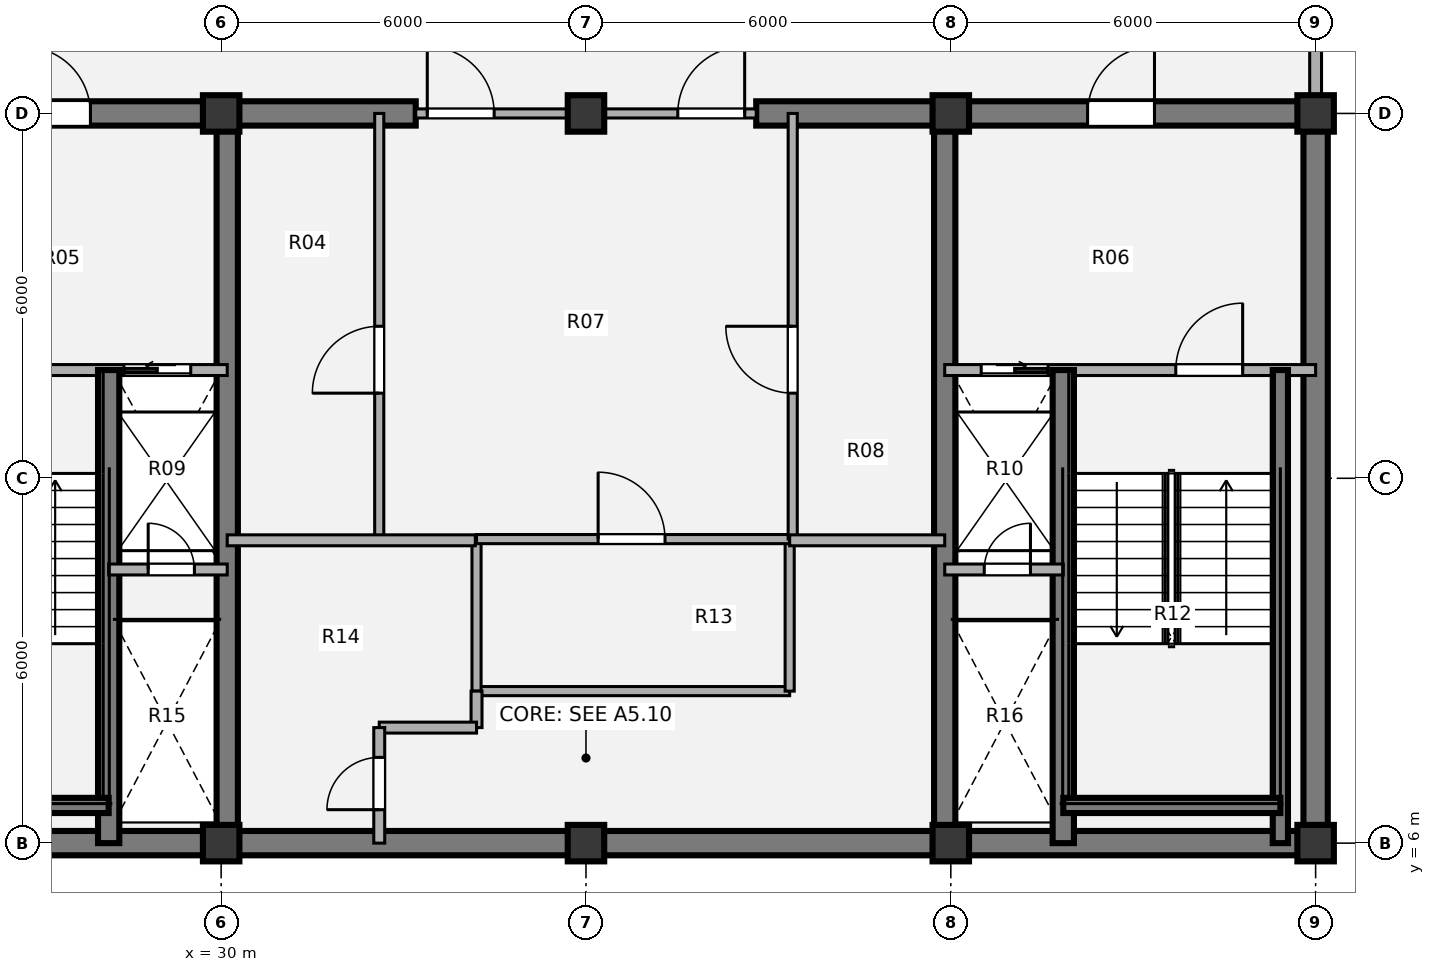
"""IFC4 building model, lengths in metres.
Left out: names, types, materials, properties, quantities, classifications, styles, units other than length and angle.
Written with IfcOpenShell. Run it as: python <this file> out.ifc"""

import sys

from ifc_helpers import new_model, si_unit, direction, frame, frame_2d, origin, origin_2d, place, context, subcontext, project, spatial, rectangle, extrude, source, transform, mapped, element, fill, save


model = new_model("IFC4")
c1 = context("Model", 3, precision=1e-05, world=origin(), true_north=direction((0.0, 1.0)))
c2 = subcontext(c1, "Body", "Model", "MODEL_VIEW")
j1 = project(units=[si_unit("LENGTHUNIT", "METRE"), si_unit("PLANEANGLEUNIT", "RADIAN")], contexts=[c1])
p1 = place(None, origin())
s1 = spatial("IfcSite", under=j1, at=p1, CompositionType="ELEMENT")
p2 = place(p1, origin())
s2 = spatial("IfcBuilding", under=s1, at=p2, CompositionType="ELEMENT")
p3 = place(p2, frame((0.0, 0.0, 307.8)))
s3 = spatial("IfcBuildingStorey", under=s2, at=p3, CompositionType="ELEMENT", Elevation=307.8)
m1 = source(origin(), c2, "Body", "SweptSolid", [
    extrude(rectangle(XDim=0.6, YDim=0.6, at=origin_2d()), origin(), (0.0, 0.0, 1.0), 3.96),
])
for number, where, z_axis, x_axis in (
    (1, (30.0, 6.0, 0.0), (0.0, 0.0, 1.0), (1.0, 0.0, 0.0)),
    (2, (36.0, 6.0, 0.0), (0.0, 0.0, 1.0), (1.0, 0.0, 0.0)),
    (3, (42.0, 6.0, 0.0), (0.0, 0.0, 1.0), (1.0, 0.0, 0.0)),
    (4, (48.0, 6.0, 0.0), (0.0, 0.0, 1.0), (1.0, 0.0, 0.0)),
    (5, (30.0, 18.0, 0.0), (0.0, 0.0, 1.0), (1.0, 0.0, 0.0)),
    (6, (36.0, 18.0, 0.0), (0.0, 0.0, 1.0), (1.0, 0.0, 0.0)),
    (7, (42.0, 18.0, 0.0), (0.0, 0.0, 1.0), (1.0, 0.0, 0.0)),
    (8, (48.0, 18.0, 0.0), (0.0, 0.0, 1.0), (1.0, 0.0, 0.0)),
):
    element("IfcColumn", number, at=place(p3, frame(where, z_axis=z_axis, x_axis=x_axis)), inside=s3, PredefinedType="COLUMN", context=c2, shape_type="MappedRepresentation", body=[
        mapped(m1, transform((0.0, 0.0, 0.0), x_axis=(1.0, 0.0, 0.0), y_axis=(0.0, 1.0, 0.0), z_axis=(0.0, 0.0, 1.0), scale=1.0)),
    ])
p4 = place(p3, frame((48.2, 6.0, 0.0), z_axis=(0.0, 0.0, 1.0), x_axis=(-1.0, 0.0, 0.0)))
e9 = element("IfcWall", 9, at=p4, inside=s3, PredefinedType="SHEAR", context=c2, shape_type="SweptSolid", body=[
    extrude(rectangle(XDim=24.4, YDim=0.4, at=frame_2d((12.2, 0.0))), origin(), (0.0, 0.0, 1.0), 3.96),
])
p5 = place(p3, frame((48.0, 18.0, 0.0), z_axis=(0.0, 0.0, 1.0), x_axis=(0.0, -1.0, 0.0)))
e10 = element("IfcWall", 10, at=p5, inside=s3, PredefinedType="SHEAR", context=c2, shape_type="SweptSolid", body=[
    extrude(rectangle(XDim=12.0, YDim=0.4, at=frame_2d((6.0, 0.0))), origin(), (0.0, 0.0, 1.0), 3.96),
])
p6 = place(p3, frame((23.8, 18.0, 0.0), z_axis=(0.0, 0.0, 1.0), x_axis=(1.0, 0.0, 0.0)))
e11 = element("IfcWall", 11, at=p6, inside=s3, PredefinedType="SHEAR", context=c2, shape_type="SweptSolid", body=[
    extrude(rectangle(XDim=9.4, YDim=0.4, at=frame_2d((4.7, 0.0))), origin(), (0.0, 0.0, 1.0), 3.96),
])
p7 = place(p6, frame((2.95, 0.0, 0.0)))
e12 = element("IfcOpeningElement", 12, at=p7, cuts=e11, PredefinedType="OPENING", context=c2, shape_type="SweptSolid", body=[
    extrude(rectangle(XDim=1.1, YDim=2.1, at=origin_2d()), frame((0.55, 0.21, 1.05), z_axis=(0.0, -1.0, 0.0), x_axis=(1.0, 0.0, 0.0)), (0.0, 0.0, 1.0), 0.42),
])
p8 = place(p3, frame((38.8, 18.0, 0.0), z_axis=(0.0, 0.0, 1.0), x_axis=(1.0, 0.0, 0.0)))
e13 = element("IfcWall", 13, at=p8, inside=s3, PredefinedType="SHEAR", context=c2, shape_type="SweptSolid", body=[
    extrude(rectangle(XDim=9.4, YDim=0.4, at=frame_2d((4.7, 0.0))), origin(), (0.0, 0.0, 1.0), 3.96),
])
p9 = place(p8, frame((5.45, 0.0, 0.0)))
e14 = element("IfcOpeningElement", 14, at=p9, cuts=e13, PredefinedType="OPENING", context=c2, shape_type="SweptSolid", body=[
    extrude(rectangle(XDim=1.1, YDim=2.1, at=origin_2d()), frame((0.55, 0.21, 1.05), z_axis=(0.0, -1.0, 0.0), x_axis=(1.0, 0.0, 0.0)), (0.0, 0.0, 1.0), 0.42),
])
for number, where, z_axis, x_axis in (
    (15, (30.1, 6.0, 0.0), (0.0, 0.0, 1.0), (0.0, 1.0, 0.0)),
    (16, (41.9, 18.0, 0.0), (0.0, 0.0, 1.0), (0.0, -1.0, 0.0)),
):
    element("IfcWall", number, at=place(p3, frame(where, z_axis=z_axis, x_axis=x_axis)), inside=s3, PredefinedType="SHEAR", context=c2, shape_type="SweptSolid", body=[
        extrude(rectangle(XDim=12.0, YDim=0.35, at=frame_2d((6.0, 0.0))), origin(), (0.0, 0.0, 1.0), 3.96),
    ])
p10 = place(p3, frame((48.0, 21.05, 0.0), z_axis=(0.0, 0.0, 1.0), x_axis=(0.0, -1.0, 0.0)))
e17 = element("IfcWall", 17, at=p10, inside=s3, PredefinedType="SOLIDWALL", context=c2, shape_type="SweptSolid", body=[
    extrude(rectangle(XDim=2.77, YDim=0.195, at=frame_2d((1.385, 0.0))), origin(), (0.0, 0.0, 1.0), 2.898),
])
p11 = place(p3, frame((32.6, 11.0, 0.0), z_axis=(0.0, 0.0, 1.0), x_axis=(0.0, 1.0, 0.0)))
e18 = element("IfcWall", 18, at=p11, inside=s3, PredefinedType="PARTITIONING", context=c2, shape_type="SweptSolid", body=[
    extrude(rectangle(XDim=7.0, YDim=0.15, at=frame_2d((3.5, 0.0))), origin(), (0.0, 0.0, 1.0), 3.68),
])
p12 = place(p11, frame((2.4, 0.0, 0.0)))
e19 = element("IfcOpeningElement", 19, at=p12, cuts=e18, PredefinedType="OPENING", context=c2, shape_type="SweptSolid", body=[
    extrude(rectangle(XDim=1.1, YDim=2.1, at=origin_2d()), frame((0.55, 0.085, 1.05), z_axis=(0.0, -1.0, 0.0), x_axis=(1.0, 0.0, 0.0)), (0.0, 0.0, 1.0), 0.17),
])
p13 = place(p3, frame((34.2, 8.5, 0.0), z_axis=(0.0, 0.0, 1.0), x_axis=(1.0, 0.0, 0.0)))
e20 = element("IfcWall", 20, at=p13, inside=s3, PredefinedType="PARTITIONING", context=c2, shape_type="SweptSolid", body=[
    extrude(rectangle(XDim=5.15, YDim=0.15, at=frame_2d((2.575, 0.0))), origin(), (0.0, 0.0, 1.0), 3.68),
])
for number, where, z_axis, x_axis in (
    (21, (34.2, 8.5, 0.0), (0.0, 0.0, 1.0), (0.0, 1.0, 0.0)),
    (22, (39.35, 8.5, 0.0), (0.0, 0.0, 1.0), (0.0, 1.0, 0.0)),
):
    element("IfcWall", number, at=place(p3, frame(where, z_axis=z_axis, x_axis=x_axis)), inside=s3, PredefinedType="PARTITIONING", context=c2, shape_type="SweptSolid", body=[
        extrude(rectangle(XDim=2.5, YDim=0.15, at=frame_2d((1.25, 0.0))), origin(), (0.0, 0.0, 1.0), 3.68),
    ])
p14 = place(p3, frame((34.2, 11.0, 0.0), z_axis=(0.0, 0.0, 1.0), x_axis=(1.0, 0.0, 0.0)))
e23 = element("IfcWall", 23, at=p14, inside=s3, PredefinedType="PARTITIONING", context=c2, shape_type="SweptSolid", body=[
    extrude(rectangle(XDim=5.15, YDim=0.15, at=frame_2d((2.575, 0.0))), origin(), (0.0, 0.0, 1.0), 3.68),
])
p15 = place(p14, frame((2.0, 0.0, 0.0)))
e24 = element("IfcOpeningElement", 24, at=p15, cuts=e23, PredefinedType="OPENING", context=c2, shape_type="SweptSolid", body=[
    extrude(rectangle(XDim=1.1, YDim=2.1, at=origin_2d()), frame((0.55, 0.085, 1.05), z_axis=(0.0, -1.0, 0.0), x_axis=(1.0, 0.0, 0.0)), (0.0, 0.0, 1.0), 0.17),
])
p16 = place(p3, frame((39.4, 11.0, 0.0), z_axis=(0.0, 0.0, 1.0), x_axis=(0.0, 1.0, 0.0)))
e25 = element("IfcWall", 25, at=p16, inside=s3, PredefinedType="PARTITIONING", context=c2, shape_type="SweptSolid", body=[
    extrude(rectangle(XDim=7.0, YDim=0.15, at=frame_2d((3.5, 0.0))), origin(), (0.0, 0.0, 1.0), 3.68),
])
p17 = place(p16, frame((2.4, 0.0, 0.0)))
e26 = element("IfcOpeningElement", 26, at=p17, cuts=e25, PredefinedType="OPENING", context=c2, shape_type="SweptSolid", body=[
    extrude(rectangle(XDim=1.1, YDim=2.1, at=origin_2d()), frame((0.55, 0.085, 1.05), z_axis=(0.0, -1.0, 0.0), x_axis=(1.0, 0.0, 0.0)), (0.0, 0.0, 1.0), 0.17),
])
p18 = place(p3, frame((30.1, 10.98, 0.0), z_axis=(0.0, 0.0, 1.0), x_axis=(1.0, 0.0, 0.0)))
e27 = element("IfcWall", 27, at=p18, inside=s3, PredefinedType="PARTITIONING", context=c2, shape_type="SweptSolid", body=[
    extrude(rectangle(XDim=4.08, YDim=0.18, at=frame_2d((2.04, 0.0))), origin(), (0.0, 0.0, 1.0), 3.68),
])
p19 = place(p3, frame((34.2, 7.9, 0.0), z_axis=(0.0, 0.0, 1.0), x_axis=(0.0, 1.0, 0.0)))
e28 = element("IfcWall", 28, at=p19, inside=s3, PredefinedType="PARTITIONING", context=c2, shape_type="SweptSolid", body=[
    extrude(rectangle(XDim=0.6, YDim=0.18, at=frame_2d((0.3, 0.0))), origin(), (0.0, 0.0, 1.0), 3.68),
])
p20 = place(p3, frame((32.6, 7.9, 0.0), z_axis=(0.0, 0.0, 1.0), x_axis=(1.0, 0.0, 0.0)))
e29 = element("IfcWall", 29, at=p20, inside=s3, PredefinedType="PARTITIONING", context=c2, shape_type="SweptSolid", body=[
    extrude(rectangle(XDim=1.6, YDim=0.18, at=frame_2d((0.8, 0.0))), origin(), (0.0, 0.0, 1.0), 3.68),
])
p21 = place(p3, frame((32.6, 6.0, 0.0), z_axis=(0.0, 0.0, 1.0), x_axis=(0.0, 1.0, 0.0)))
e30 = element("IfcWall", 30, at=p21, inside=s3, PredefinedType="PARTITIONING", context=c2, shape_type="SweptSolid", body=[
    extrude(rectangle(XDim=1.9, YDim=0.18, at=frame_2d((0.95, 0.0))), origin(), (0.0, 0.0, 1.0), 3.68),
])
p22 = place(p21, frame((0.55, 0.0, 0.0)))
e31 = element("IfcOpeningElement", 31, at=p22, cuts=e30, PredefinedType="OPENING", context=c2, shape_type="SweptSolid", body=[
    extrude(rectangle(XDim=0.86, YDim=2.1, at=origin_2d()), frame((0.43, 0.1, 1.05), z_axis=(0.0, -1.0, 0.0), x_axis=(1.0, 0.0, 0.0)), (0.0, 0.0, 1.0), 0.2),
])
p23 = place(p3, frame((39.35, 10.98, 0.0), z_axis=(0.0, 0.0, 1.0), x_axis=(1.0, 0.0, 0.0)))
e32 = element("IfcWall", 32, at=p23, inside=s3, PredefinedType="PARTITIONING", context=c2, shape_type="SweptSolid", body=[
    extrude(rectangle(XDim=2.55, YDim=0.18, at=frame_2d((1.275, 0.0))), origin(), (0.0, 0.0, 1.0), 3.68),
])
p24 = place(p3, frame((33.2, 18.0, 0.0), z_axis=(0.0, 0.0, 1.0), x_axis=(1.0, 0.0, 0.0)))
e33 = element("IfcWall", 33, at=p24, inside=s3, PredefinedType="PARTITIONING", context=c2, shape_type="SweptSolid", body=[
    extrude(rectangle(XDim=5.6, YDim=0.15, at=frame_2d((2.8, 0.0))), origin(), (0.0, 0.0, 1.0), 2.695),
])
p25 = place(p24, frame((0.19, 0.0, 0.0)))
e34 = element("IfcOpeningElement", 34, at=p25, cuts=e33, PredefinedType="OPENING", context=c2, shape_type="SweptSolid", body=[
    extrude(rectangle(XDim=1.1, YDim=2.1, at=origin_2d()), frame((0.55, 0.085, 1.05), z_axis=(0.0, -1.0, 0.0), x_axis=(1.0, 0.0, 0.0)), (0.0, 0.0, 1.0), 0.17),
])
p26 = place(p24, frame((4.31, 0.0, 0.0)))
e35 = element("IfcOpeningElement", 35, at=p26, cuts=e33, PredefinedType="OPENING", context=c2, shape_type="SweptSolid", body=[
    extrude(rectangle(XDim=1.1, YDim=2.1, at=origin_2d()), frame((0.55, 0.085, 1.05), z_axis=(0.0, -1.0, 0.0), x_axis=(1.0, 0.0, 0.0)), (0.0, 0.0, 1.0), 0.17),
])
p27 = place(p3, frame((24.0, 13.78, 0.0), z_axis=(0.0, 0.0, 1.0), x_axis=(1.0, 0.0, 0.0)))
e36 = element("IfcWall", 36, at=p27, inside=s3, PredefinedType="PARTITIONING", context=c2, shape_type="SweptSolid", body=[
    extrude(rectangle(XDim=6.1, YDim=0.18, at=frame_2d((3.05, 0.0))), origin(), (0.0, 0.0, 1.0), 3.68),
])
p28 = place(p27, frame((1.15, 0.0, 0.0)))
e37 = element("IfcOpeningElement", 37, at=p28, cuts=e36, PredefinedType="OPENING", context=c2, shape_type="SweptSolid", body=[
    extrude(rectangle(XDim=1.1, YDim=2.1, at=origin_2d()), frame((0.55, 0.1, 1.05), z_axis=(0.0, -1.0, 0.0), x_axis=(1.0, 0.0, 0.0)), (0.0, 0.0, 1.0), 0.2),
])
p29 = place(p27, frame((4.4, 0.0, 0.0)))
e38 = element("IfcOpeningElement", 38, at=p29, cuts=e36, PredefinedType="OPENING", context=c2, shape_type="SweptSolid", body=[
    extrude(rectangle(XDim=1.1, YDim=2.1, at=origin_2d()), frame((0.55, 0.1, 1.05), z_axis=(0.0, -1.0, 0.0), x_axis=(1.0, 0.0, 0.0)), (0.0, 0.0, 1.0), 0.2),
])
p30 = place(p3, frame((28.15, 6.0, 0.0), z_axis=(0.0, 0.0, 1.0), x_axis=(0.0, 1.0, 0.0)))
e39 = element("IfcWall", 39, at=p30, inside=s3, PredefinedType="SHEAR", context=c2, shape_type="SweptSolid", body=[
    extrude(rectangle(XDim=7.78, YDim=0.35, at=frame_2d((3.89, 0.0))), origin(), (0.0, 0.0, 1.0), 4.03),
])
p31 = place(p3, frame((24.58, 6.62, 0.0), z_axis=(0.0, 0.0, 1.0), x_axis=(1.0, 0.0, 0.0)))
e40 = element("IfcWall", 40, at=p31, inside=s3, PredefinedType="SHEAR", context=c2, shape_type="SweptSolid", body=[
    extrude(rectangle(XDim=3.57, YDim=0.25, at=frame_2d((1.785, 0.0))), origin(), (0.0, 0.0, 1.0), 4.03),
])
p32 = place(p3, frame((28.15, 10.5, 0.0), z_axis=(0.0, 0.0, 1.0), x_axis=(1.0, 0.0, 0.0)))
e41 = element("IfcWall", 41, at=p32, inside=s3, PredefinedType="PARTITIONING", context=c2, shape_type="SweptSolid", body=[
    extrude(rectangle(XDim=1.95, YDim=0.18, at=frame_2d((0.975, 0.0))), origin(), (0.0, 0.0, 1.0), 3.68),
])
p33 = place(p32, frame((0.65, 0.0, 0.0)))
e42 = element("IfcOpeningElement", 42, at=p33, cuts=e41, PredefinedType="OPENING", context=c2, shape_type="SweptSolid", body=[
    extrude(rectangle(XDim=0.76, YDim=2.05, at=origin_2d()), frame((0.38, 0.1, 1.025), z_axis=(0.0, -1.0, 0.0), x_axis=(1.0, 0.0, 0.0)), (0.0, 0.0, 1.0), 0.2),
])
p34 = place(p3, frame((41.9, 13.78, 0.0), z_axis=(0.0, 0.0, 1.0), x_axis=(1.0, 0.0, 0.0)))
e43 = element("IfcWall", 43, at=p34, inside=s3, PredefinedType="PARTITIONING", context=c2, shape_type="SweptSolid", body=[
    extrude(rectangle(XDim=6.1, YDim=0.18, at=frame_2d((3.05, 0.0))), origin(), (0.0, 0.0, 1.0), 3.68),
])
p35 = place(p34, frame((0.6, 0.0, 0.0)))
e44 = element("IfcOpeningElement", 44, at=p35, cuts=e43, PredefinedType="OPENING", context=c2, shape_type="SweptSolid", body=[
    extrude(rectangle(XDim=1.1, YDim=2.1, at=origin_2d()), frame((0.55, 0.1, 1.05), z_axis=(0.0, -1.0, 0.0), x_axis=(1.0, 0.0, 0.0)), (0.0, 0.0, 1.0), 0.2),
])
p36 = place(p34, frame((3.8, 0.0, 0.0)))
e45 = element("IfcOpeningElement", 45, at=p36, cuts=e43, PredefinedType="OPENING", context=c2, shape_type="SweptSolid", body=[
    extrude(rectangle(XDim=1.1, YDim=2.1, at=origin_2d()), frame((0.55, 0.1, 1.05), z_axis=(0.0, -1.0, 0.0), x_axis=(1.0, 0.0, 0.0)), (0.0, 0.0, 1.0), 0.2),
])
p37 = place(p3, frame((43.85, 6.0, 0.0), z_axis=(0.0, 0.0, 1.0), x_axis=(0.0, 1.0, 0.0)))
e46 = element("IfcWall", 46, at=p37, inside=s3, PredefinedType="SHEAR", context=c2, shape_type="SweptSolid", body=[
    extrude(rectangle(XDim=7.78, YDim=0.35, at=frame_2d((3.89, 0.0))), origin(), (0.0, 0.0, 1.0), 4.03),
])
p38 = place(p3, frame((47.42, 6.0, 0.0), z_axis=(0.0, 0.0, 1.0), x_axis=(0.0, 1.0, 0.0)))
e47 = element("IfcWall", 47, at=p38, inside=s3, PredefinedType="SHEAR", context=c2, shape_type="SweptSolid", body=[
    extrude(rectangle(XDim=7.78, YDim=0.25, at=frame_2d((3.89, 0.0))), origin(), (0.0, 0.0, 1.0), 4.03),
])
p39 = place(p3, frame((43.85, 6.62, 0.0), z_axis=(0.0, 0.0, 1.0), x_axis=(1.0, 0.0, 0.0)))
e48 = element("IfcWall", 48, at=p39, inside=s3, PredefinedType="SHEAR", context=c2, shape_type="SweptSolid", body=[
    extrude(rectangle(XDim=3.57, YDim=0.25, at=frame_2d((1.785, 0.0))), origin(), (0.0, 0.0, 1.0), 4.03),
])
p40 = place(p3, frame((41.9, 10.5, 0.0), z_axis=(0.0, 0.0, 1.0), x_axis=(1.0, 0.0, 0.0)))
e49 = element("IfcWall", 49, at=p40, inside=s3, PredefinedType="PARTITIONING", context=c2, shape_type="SweptSolid", body=[
    extrude(rectangle(XDim=1.95, YDim=0.18, at=frame_2d((0.975, 0.0))), origin(), (0.0, 0.0, 1.0), 3.68),
])
p41 = place(p40, frame((0.65, 0.0, 0.0)))
e50 = element("IfcOpeningElement", 50, at=p41, cuts=e49, PredefinedType="OPENING", context=c2, shape_type="SweptSolid", body=[
    extrude(rectangle(XDim=0.76, YDim=2.05, at=origin_2d()), frame((0.38, 0.1, 1.025), z_axis=(0.0, -1.0, 0.0), x_axis=(1.0, 0.0, 0.0)), (0.0, 0.0, 1.0), 0.2),
])
m2 = source(origin(), c2, "Body", "SweptSolid", [
    extrude(rectangle(XDim=1.1, YDim=2.1, at=origin_2d()), frame((0.55, 0.025, 1.05), z_axis=(0.0, -1.0, 0.0), x_axis=(1.0, 0.0, 0.0)), (0.0, 0.0, 1.0), 0.05),
])
p42 = place(p12, origin())
e51 = element("IfcDoor", 51, at=p42, inside=s3, OperationType="SINGLE_SWING_LEFT", PredefinedType="DOOR", context=c2, shape_type="MappedRepresentation", body=[
    mapped(m2, transform((0.0, 0.0, 0.0), x_axis=(1.0, 0.0, 0.0), y_axis=(0.0, 1.0, 0.0), z_axis=(0.0, 0.0, 1.0), scale=1.0)),
])
fill(e19, e51)
p43 = place(p15, origin())
e52 = element("IfcDoor", 52, at=p43, inside=s3, OperationType="SINGLE_SWING_LEFT", PredefinedType="DOOR", context=c2, shape_type="MappedRepresentation", body=[
    mapped(m2, transform((0.0, 0.0, 0.0), x_axis=(1.0, 0.0, 0.0), y_axis=(0.0, 1.0, 0.0), z_axis=(0.0, 0.0, 1.0), scale=1.0)),
])
fill(e24, e52)
p44 = place(p17, origin())
e53 = element("IfcDoor", 53, at=p44, inside=s3, OperationType="SINGLE_SWING_RIGHT", PredefinedType="DOOR", context=c2, shape_type="MappedRepresentation", body=[
    mapped(m2, transform((0.0, 0.0, 0.0), x_axis=(1.0, 0.0, 0.0), y_axis=(0.0, 1.0, 0.0), z_axis=(0.0, 0.0, 1.0), scale=1.0)),
])
fill(e26, e53)
m3 = source(origin(), c2, "Body", "SweptSolid", [
    extrude(rectangle(XDim=0.86, YDim=2.1, at=origin_2d()), frame((0.43, 0.025, 1.05), z_axis=(0.0, -1.0, 0.0), x_axis=(1.0, 0.0, 0.0)), (0.0, 0.0, 1.0), 0.05),
])
p45 = place(p22, origin())
e54 = element("IfcDoor", 54, at=p45, inside=s3, OperationType="SINGLE_SWING_LEFT", PredefinedType="DOOR", context=c2, shape_type="MappedRepresentation", body=[
    mapped(m3, transform((0.0, 0.0, 0.0), x_axis=(1.0, 0.0, 0.0), y_axis=(0.0, 1.0, 0.0), z_axis=(0.0, 0.0, 1.0), scale=1.0)),
])
fill(e31, e54)
m4 = source(origin(), c2, "Body", "SweptSolid", [
    extrude(rectangle(XDim=1.1, YDim=2.1, at=origin_2d()), frame((0.55, 0.025, 1.05), z_axis=(0.0, -1.0, 0.0), x_axis=(1.0, 0.0, 0.0)), (0.0, 0.0, 1.0), 0.05),
])
p46 = place(p25, origin())
e55 = element("IfcDoor", 55, at=p46, inside=s3, OperationType="SINGLE_SWING_LEFT", PredefinedType="DOOR", context=c2, shape_type="MappedRepresentation", body=[
    mapped(m4, transform((0.0, 0.0, 0.0), x_axis=(1.0, 0.0, 0.0), y_axis=(0.0, 1.0, 0.0), z_axis=(0.0, 0.0, 1.0), scale=1.0)),
])
fill(e34, e55)
p47 = place(p26, origin())
e56 = element("IfcDoor", 56, at=p47, inside=s3, OperationType="SINGLE_SWING_RIGHT", PredefinedType="DOOR", context=c2, shape_type="MappedRepresentation", body=[
    mapped(m4, transform((0.0, 0.0, 0.0), x_axis=(1.0, 0.0, 0.0), y_axis=(0.0, 1.0, 0.0), z_axis=(0.0, 0.0, 1.0), scale=1.0)),
])
fill(e35, e56)
m5 = source(origin(), c2, "Body", "SweptSolid", [
    extrude(rectangle(XDim=1.1, YDim=2.1, at=origin_2d()), frame((0.55, 0.025, 1.05), z_axis=(0.0, -1.0, 0.0), x_axis=(1.0, 0.0, 0.0)), (0.0, 0.0, 1.0), 0.05),
])
p48 = place(p29, origin())
e57 = element("IfcDoor", 57, at=p48, inside=s3, OperationType="SLIDING_TO_LEFT", PredefinedType="DOOR", context=c2, shape_type="MappedRepresentation", body=[
    mapped(m5, transform((0.0, 0.0, 0.0), x_axis=(1.0, 0.0, 0.0), y_axis=(0.0, 1.0, 0.0), z_axis=(0.0, 0.0, 1.0), scale=1.0)),
])
fill(e38, e57)
m6 = source(origin(), c2, "Body", "SweptSolid", [
    extrude(rectangle(XDim=0.76, YDim=2.05, at=origin_2d()), frame((0.38, 0.025, 1.025), z_axis=(0.0, -1.0, 0.0), x_axis=(1.0, 0.0, 0.0)), (0.0, 0.0, 1.0), 0.05),
])
p49 = place(p33, origin())
e58 = element("IfcDoor", 58, at=p49, inside=s3, OperationType="SINGLE_SWING_LEFT", PredefinedType="DOOR", context=c2, shape_type="MappedRepresentation", body=[
    mapped(m6, transform((0.0, 0.0, 0.0), x_axis=(1.0, 0.0, 0.0), y_axis=(0.0, 1.0, 0.0), z_axis=(0.0, 0.0, 1.0), scale=1.0)),
])
fill(e42, e58)
p50 = place(p35, origin())
e59 = element("IfcDoor", 59, at=p50, inside=s3, OperationType="SLIDING_TO_RIGHT", PredefinedType="DOOR", context=c2, shape_type="MappedRepresentation", body=[
    mapped(m5, transform((0.0, 0.0, 0.0), x_axis=(1.0, 0.0, 0.0), y_axis=(0.0, 1.0, 0.0), z_axis=(0.0, 0.0, 1.0), scale=1.0)),
])
fill(e44, e59)
m7 = source(origin(), c2, "Body", "SweptSolid", [
    extrude(rectangle(XDim=1.1, YDim=2.1, at=origin_2d()), frame((0.55, 0.025, 1.05), z_axis=(0.0, -1.0, 0.0), x_axis=(1.0, 0.0, 0.0)), (0.0, 0.0, 1.0), 0.05),
])
p51 = place(p36, origin())
e60 = element("IfcDoor", 60, at=p51, inside=s3, OperationType="SINGLE_SWING_RIGHT", PredefinedType="DOOR", context=c2, shape_type="MappedRepresentation", body=[
    mapped(m7, transform((0.0, 0.0, 0.0), x_axis=(1.0, 0.0, 0.0), y_axis=(0.0, 1.0, 0.0), z_axis=(0.0, 0.0, 1.0), scale=1.0)),
])
fill(e45, e60)
p52 = place(p41, origin())
e61 = element("IfcDoor", 61, at=p52, inside=s3, OperationType="SINGLE_SWING_RIGHT", PredefinedType="DOOR", context=c2, shape_type="MappedRepresentation", body=[
    mapped(m6, transform((0.0, 0.0, 0.0), x_axis=(1.0, 0.0, 0.0), y_axis=(0.0, 1.0, 0.0), z_axis=(0.0, 0.0, 1.0), scale=1.0)),
])
fill(e50, e61)
p53 = place(p7, origin())
e62 = element("IfcDoor", 62, at=p53, inside=s3, OperationType="SINGLE_SWING_LEFT", PredefinedType="DOOR", context=c2, shape_type="MappedRepresentation", body=[
    mapped(m4, transform((0.0, 0.0, 0.0), x_axis=(1.0, 0.0, 0.0), y_axis=(0.0, 1.0, 0.0), z_axis=(0.0, 0.0, 1.0), scale=1.0)),
])
fill(e12, e62)
p54 = place(p9, origin())
e63 = element("IfcDoor", 63, at=p54, inside=s3, OperationType="SINGLE_SWING_RIGHT", PredefinedType="DOOR", context=c2, shape_type="MappedRepresentation", body=[
    mapped(m4, transform((0.0, 0.0, 0.0), x_axis=(1.0, 0.0, 0.0), y_axis=(0.0, 1.0, 0.0), z_axis=(0.0, 0.0, 1.0), scale=1.0)),
])
fill(e14, e63)
save(model, sys.argv[1])
